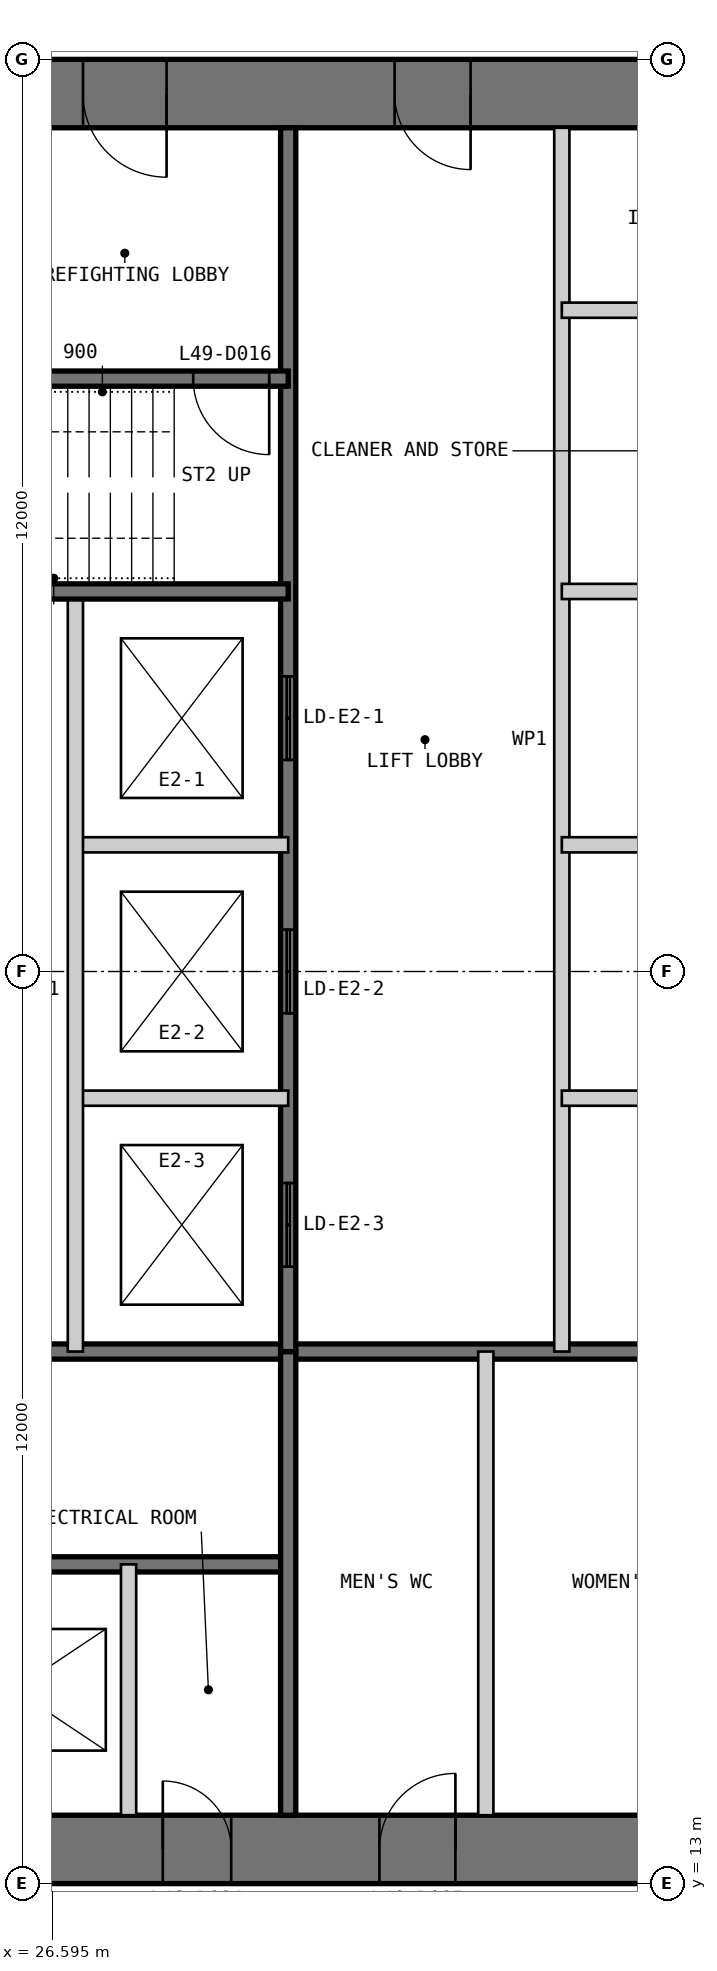
"""IFC4 building model, lengths in metres.
Left out: names, types, materials, properties, quantities, classifications, styles, units other than length and angle.
Written with IfcOpenShell. Run it as: python <this file> out.ifc"""

import sys

from ifc_helpers import new_model, si_unit, direction, frame, frame_2d, origin, place, context, subcontext, project, spatial, polyline, rectangle, outline, extrude, element, fill, save


model = new_model("IFC4")
c1 = context("Model", 3, precision=1e-05, world=origin(), true_north=direction((0.0, 1.0)))
c2 = subcontext(c1, "Body", "Model", "MODEL_VIEW")
j1 = project(units=[si_unit("LENGTHUNIT", "METRE"), si_unit("PLANEANGLEUNIT", "RADIAN")], contexts=[c1])
p1 = place(None, origin())
s1 = spatial("IfcSite", under=j1, at=p1, CompositionType="ELEMENT")
p2 = place(p1, origin())
s2 = spatial("IfcBuilding", under=s1, at=p2, CompositionType="ELEMENT")
p3 = place(p2, frame((0.0, 0.0, 209.8)))
s3 = spatial("IfcBuildingStorey", under=s2, at=p3, CompositionType="ELEMENT", Elevation=209.8)
p4 = place(p3, frame((13.0, 13.45, 0.0), z_axis=(0.0, 0.0, 1.0), x_axis=(1.0, 0.0, 0.0)))
e1 = element("IfcWall", 1, at=p4, inside=s3, PredefinedType="SHEAR", context=c2, shape_type="SweptSolid", body=[
    extrude(outline(polyline([(0.0, -0.45), (24.0, -0.45), (23.1, 0.45), (0.9, 0.45), (0.0, -0.45)])), origin(), (0.0, 0.0, 1.0), 4.0),
])
p5 = place(p4, frame((4.9, 0.0, 0.0)))
e2 = element("IfcOpeningElement", 2, at=p5, cuts=e1, PredefinedType="OPENING", context=c2, shape_type="SweptSolid", body=[
    extrude(rectangle(XDim=1.0, YDim=2.2, at=frame_2d((0.5, 1.1))), frame((0.0, 0.46, 0.0), z_axis=(0.0, -1.0, 0.0), x_axis=(1.0, 0.0, 0.0)), (0.0, 0.0, 1.0), 0.92),
])
p6 = place(p4, frame((8.9, 0.0, 0.0)))
e3 = element("IfcOpeningElement", 3, at=p6, cuts=e1, PredefinedType="OPENING", context=c2, shape_type="SweptSolid", body=[
    extrude(rectangle(XDim=1.1, YDim=2.2, at=frame_2d((0.55, 1.1))), frame((0.0, 0.46, 0.0), z_axis=(0.0, -1.0, 0.0), x_axis=(1.0, 0.0, 0.0)), (0.0, 0.0, 1.0), 0.92),
])
p7 = place(p4, frame((15.05, 0.0, 0.0)))
e4 = element("IfcOpeningElement", 4, at=p7, cuts=e1, PredefinedType="OPENING", context=c2, shape_type="SweptSolid", body=[
    extrude(rectangle(XDim=0.9, YDim=2.2, at=frame_2d((0.45, 1.1))), frame((0.0, 0.46, 0.0), z_axis=(0.0, -1.0, 0.0), x_axis=(1.0, 0.0, 0.0)), (0.0, 0.0, 1.0), 0.92),
])
p8 = place(p4, frame((17.9, 0.0, 0.0)))
e5 = element("IfcOpeningElement", 5, at=p8, cuts=e1, PredefinedType="OPENING", context=c2, shape_type="SweptSolid", body=[
    extrude(rectangle(XDim=1.0, YDim=2.2, at=frame_2d((0.5, 1.1))), frame((0.0, 0.46, 0.0), z_axis=(0.0, -1.0, 0.0), x_axis=(1.0, 0.0, 0.0)), (0.0, 0.0, 1.0), 0.92),
])
p9 = place(p4, frame((21.4, 0.0, 0.0)))
e6 = element("IfcOpeningElement", 6, at=p9, cuts=e1, PredefinedType="OPENING", context=c2, shape_type="SweptSolid", body=[
    extrude(rectangle(XDim=1.0, YDim=2.2, at=frame_2d((0.5, 1.1))), frame((0.0, 0.46, 0.0), z_axis=(0.0, -1.0, 0.0), x_axis=(1.0, 0.0, 0.0)), (0.0, 0.0, 1.0), 0.92),
])
p10 = place(p3, frame((37.0, 36.55, 0.0), z_axis=(0.0, 0.0, 1.0), x_axis=(-1.0, 0.0, 0.0)))
e7 = element("IfcWall", 7, at=p10, inside=s3, PredefinedType="SHEAR", context=c2, shape_type="SweptSolid", body=[
    extrude(outline(polyline([(0.0, -0.45), (24.0, -0.45), (23.1, 0.45), (0.9, 0.45), (0.0, -0.45)])), origin(), (0.0, 0.0, 1.0), 4.0),
])
p11 = place(p10, frame((4.9, 0.0, 0.0)))
e8 = element("IfcOpeningElement", 8, at=p11, cuts=e7, PredefinedType="OPENING", context=c2, shape_type="SweptSolid", body=[
    extrude(rectangle(XDim=1.0, YDim=2.2, at=frame_2d((0.5, 1.1))), frame((0.0, 0.46, 0.0), z_axis=(0.0, -1.0, 0.0), x_axis=(1.0, 0.0, 0.0)), (0.0, 0.0, 1.0), 0.92),
])
p12 = place(p10, frame((8.9, 0.0, 0.0)))
e9 = element("IfcOpeningElement", 9, at=p12, cuts=e7, PredefinedType="OPENING", context=c2, shape_type="SweptSolid", body=[
    extrude(rectangle(XDim=1.1, YDim=2.2, at=frame_2d((0.55, 1.1))), frame((0.0, 0.46, 0.0), z_axis=(0.0, -1.0, 0.0), x_axis=(1.0, 0.0, 0.0)), (0.0, 0.0, 1.0), 0.92),
])
p13 = place(p10, frame((15.05, 0.0, 0.0)))
e10 = element("IfcOpeningElement", 10, at=p13, cuts=e7, PredefinedType="OPENING", context=c2, shape_type="SweptSolid", body=[
    extrude(rectangle(XDim=0.9, YDim=2.2, at=frame_2d((0.45, 1.1))), frame((0.0, 0.46, 0.0), z_axis=(0.0, -1.0, 0.0), x_axis=(1.0, 0.0, 0.0)), (0.0, 0.0, 1.0), 0.92),
])
p14 = place(p10, frame((17.9, 0.0, 0.0)))
e11 = element("IfcOpeningElement", 11, at=p14, cuts=e7, PredefinedType="OPENING", context=c2, shape_type="SweptSolid", body=[
    extrude(rectangle(XDim=1.0, YDim=2.2, at=frame_2d((0.5, 1.1))), frame((0.0, 0.46, 0.0), z_axis=(0.0, -1.0, 0.0), x_axis=(1.0, 0.0, 0.0)), (0.0, 0.0, 1.0), 0.92),
])
p15 = place(p10, frame((21.4, 0.0, 0.0)))
e12 = element("IfcOpeningElement", 12, at=p15, cuts=e7, PredefinedType="OPENING", context=c2, shape_type="SweptSolid", body=[
    extrude(rectangle(XDim=1.0, YDim=2.2, at=frame_2d((0.5, 1.1))), frame((0.0, 0.46, 0.0), z_axis=(0.0, -1.0, 0.0), x_axis=(1.0, 0.0, 0.0)), (0.0, 0.0, 1.0), 0.92),
])
p16 = place(p3, frame((20.3, 17.2, 0.0), z_axis=(0.0, 0.0, 1.0), x_axis=(1.0, 0.0, 0.0)))
e13 = element("IfcWall", 13, at=p16, inside=s3, PredefinedType="SOLIDWALL", context=c2, shape_type="SweptSolid", body=[
    extrude(rectangle(XDim=9.4, YDim=0.2, at=frame_2d((4.7, 0.0))), origin(), (0.0, 0.0, 1.0), 3.8),
])
p17 = place(p16, frame((0.25, 0.0, 0.0)))
e14 = element("IfcOpeningElement", 14, at=p17, cuts=e13, PredefinedType="OPENING", context=c2, shape_type="SweptSolid", body=[
    extrude(rectangle(XDim=1.0, YDim=2.2, at=frame_2d((0.5, 1.1))), frame((0.0, 0.11, 0.0), z_axis=(0.0, -1.0, 0.0), x_axis=(1.0, 0.0, 0.0)), (0.0, 0.0, 1.0), 0.22),
])
p18 = place(p3, frame((20.3, 20.0, 0.0), z_axis=(0.0, 0.0, 1.0), x_axis=(1.0, 0.0, 0.0)))
e15 = element("IfcWall", 15, at=p18, inside=s3, PredefinedType="SOLIDWALL", context=c2, shape_type="SweptSolid", body=[
    extrude(rectangle(XDim=15.8, YDim=0.2, at=frame_2d((7.9, 0.0))), origin(), (0.0, 0.0, 1.0), 3.8),
])
p19 = place(p3, frame((27.6, 13.9, 0.0), z_axis=(0.0, 0.0, 1.0), x_axis=(0.0, 1.0, 0.0)))
e16 = element("IfcWall", 16, at=p19, inside=s3, PredefinedType="PARTITIONING", context=c2, shape_type="SweptSolid", body=[
    extrude(rectangle(XDim=3.3, YDim=0.2, at=frame_2d((1.65, 0.0))), origin(), (0.0, 0.0, 1.0), 3.8),
])
p20 = place(p3, frame((29.7, 13.9, 0.0), z_axis=(0.0, 0.0, 1.0), x_axis=(0.0, 1.0, 0.0)))
e17 = element("IfcWall", 17, at=p20, inside=s3, PredefinedType="SOLIDWALL", context=c2, shape_type="SweptSolid", body=[
    extrude(rectangle(XDim=6.1, YDim=0.2, at=frame_2d((3.05, 0.0))), origin(), (0.0, 0.0, 1.0), 3.8),
])
p21 = place(p3, frame((32.3, 13.9, 0.0), z_axis=(0.0, 0.0, 1.0), x_axis=(0.0, 1.0, 0.0)))
e18 = element("IfcWall", 18, at=p21, inside=s3, PredefinedType="PARTITIONING", context=c2, shape_type="SweptSolid", body=[
    extrude(rectangle(XDim=6.1, YDim=0.2, at=frame_2d((3.05, 0.0))), origin(), (0.0, 0.0, 1.0), 3.8),
])
p22 = place(p3, frame((33.3, 36.1, 0.0), z_axis=(0.0, 0.0, 1.0), x_axis=(0.0, -1.0, 0.0)))
e19 = element("IfcWall", 19, at=p22, inside=s3, PredefinedType="PARTITIONING", context=c2, shape_type="SweptSolid", body=[
    extrude(rectangle(XDim=16.1, YDim=0.2, at=frame_2d((8.05, 0.0))), origin(), (0.0, 0.0, 1.0), 3.8),
])
p23 = place(p3, frame((29.7, 36.1, 0.0), z_axis=(0.0, 0.0, 1.0), x_axis=(0.0, -1.0, 0.0)))
e20 = element("IfcWall", 20, at=p23, inside=s3, PredefinedType="SOLIDWALL", context=c2, shape_type="SweptSolid", body=[
    extrude(rectangle(XDim=16.1, YDim=0.2, at=frame_2d((8.05, 0.0))), origin(), (0.0, 0.0, 1.0), 3.8),
])
p24 = place(p23, frame((7.217, 0.0, 0.0)))
e21 = element("IfcOpeningElement", 21, at=p24, cuts=e20, PredefinedType="OPENING", context=c2, shape_type="SweptSolid", body=[
    extrude(rectangle(XDim=1.1, YDim=2.2, at=frame_2d((0.55, 1.1))), frame((0.0, 0.11, 0.0), z_axis=(0.0, -1.0, 0.0), x_axis=(1.0, 0.0, 0.0)), (0.0, 0.0, 1.0), 0.22),
])
p25 = place(p23, frame((10.55, 0.0, 0.0)))
e22 = element("IfcOpeningElement", 22, at=p25, cuts=e20, PredefinedType="OPENING", context=c2, shape_type="SweptSolid", body=[
    extrude(rectangle(XDim=1.1, YDim=2.2, at=frame_2d((0.55, 1.1))), frame((0.0, 0.11, 0.0), z_axis=(0.0, -1.0, 0.0), x_axis=(1.0, 0.0, 0.0)), (0.0, 0.0, 1.0), 0.22),
])
p26 = place(p23, frame((13.883, 0.0, 0.0)))
e23 = element("IfcOpeningElement", 23, at=p26, cuts=e20, PredefinedType="OPENING", context=c2, shape_type="SweptSolid", body=[
    extrude(rectangle(XDim=1.1, YDim=2.2, at=frame_2d((0.55, 1.1))), frame((0.0, 0.11, 0.0), z_axis=(0.0, -1.0, 0.0), x_axis=(1.0, 0.0, 0.0)), (0.0, 0.0, 1.0), 0.22),
])
for number, where, z_axis, x_axis in (
    (24, (36.1, 30.0, 0.0), (0.0, 0.0, 1.0), (-1.0, 0.0, 0.0)),
    (25, (36.1, 26.667, 0.0), (0.0, 0.0, 1.0), (-1.0, 0.0, 0.0)),
    (26, (36.1, 23.333, 0.0), (0.0, 0.0, 1.0), (-1.0, 0.0, 0.0)),
    (27, (29.7, 26.667, 0.0), (0.0, 0.0, 1.0), (-1.0, 0.0, 0.0)),
    (28, (29.7, 23.333, 0.0), (0.0, 0.0, 1.0), (-1.0, 0.0, 0.0)),
):
    element("IfcWall", number, at=place(p3, frame(where, z_axis=z_axis, x_axis=x_axis)), inside=s3, PredefinedType="PARTITIONING", context=c2, shape_type="SweptSolid", body=[
        extrude(rectangle(XDim=2.8, YDim=0.2, at=frame_2d((1.4, 0.0))), origin(), (0.0, 0.0, 1.0), 3.8),
    ])
p27 = place(p3, frame((26.9, 30.0, 0.0), z_axis=(0.0, 0.0, 1.0), x_axis=(0.0, -1.0, 0.0)))
e29 = element("IfcWall", 29, at=p27, inside=s3, PredefinedType="PARTITIONING", context=c2, shape_type="SweptSolid", body=[
    extrude(rectangle(XDim=10.0, YDim=0.2, at=frame_2d((5.0, 0.0))), origin(), (0.0, 0.0, 1.0), 3.8),
])
p28 = place(p3, frame((29.7, 32.8, 0.0), z_axis=(0.0, 0.0, 1.0), x_axis=(-1.0, 0.0, 0.0)))
e30 = element("IfcWall", 30, at=p28, inside=s3, PredefinedType="SOLIDWALL", context=c2, shape_type="SweptSolid", body=[
    extrude(rectangle(XDim=9.4, YDim=0.2, at=frame_2d((4.7, 0.0))), origin(), (0.0, 0.0, 1.0), 3.8),
])
p29 = place(p28, frame((0.25, 0.0, 0.0)))
e31 = element("IfcOpeningElement", 31, at=p29, cuts=e30, PredefinedType="OPENING", context=c2, shape_type="SweptSolid", body=[
    extrude(rectangle(XDim=1.0, YDim=2.2, at=frame_2d((0.5, 1.1))), frame((0.0, 0.11, 0.0), z_axis=(0.0, -1.0, 0.0), x_axis=(1.0, 0.0, 0.0)), (0.0, 0.0, 1.0), 0.22),
])
p30 = place(p3, frame((29.7, 30.0, 0.0), z_axis=(0.0, 0.0, 1.0), x_axis=(-1.0, 0.0, 0.0)))
e32 = element("IfcWall", 32, at=p30, inside=s3, PredefinedType="SOLIDWALL", context=c2, shape_type="SweptSolid", body=[
    extrude(rectangle(XDim=15.8, YDim=0.2, at=frame_2d((7.9, 0.0))), origin(), (0.0, 0.0, 1.0), 3.8),
])
p31 = place(p3, frame((36.1, 33.7, 0.0), z_axis=(0.0, 0.0, 1.0), x_axis=(-1.0, 0.0, 0.0)))
e33 = element("IfcWall", 33, at=p31, inside=s3, PredefinedType="PARTITIONING", context=c2, shape_type="SweptSolid", body=[
    extrude(rectangle(XDim=2.8, YDim=0.2, at=frame_2d((1.4, 0.0))), origin(), (0.0, 0.0, 1.0), 3.8),
])
p32 = place(p7, origin())
e34 = element("IfcDoor", 34, at=p32, inside=s3, OperationType="SINGLE_SWING_LEFT", PredefinedType="DOOR", context=c2, shape_type="SweptSolid", body=[
    extrude(rectangle(XDim=0.9, YDim=2.2, at=frame_2d((0.45, 1.1))), frame((0.0, 0.025, 0.0), z_axis=(0.0, -1.0, 0.0), x_axis=(1.0, 0.0, 0.0)), (0.0, 0.0, 1.0), 0.05),
    extrude(outline(polyline([(0.0, 0.0), (0.04, 0.0), (0.04, 2.16), (0.86, 2.16), (0.86, 0.0), (0.9, 0.0), (0.9, 2.2), (0.0, 2.2), (0.0, 0.0)])), frame((0.0, 0.3, 0.0), z_axis=(0.0, -1.0, 0.0), x_axis=(1.0, 0.0, 0.0)), (0.0, 0.0, 1.0), 0.6),
])
fill(e4, e34)
p33 = place(p8, origin())
e35 = element("IfcDoor", 35, at=p33, inside=s3, OperationType="SINGLE_SWING_RIGHT", PredefinedType="DOOR", context=c2, shape_type="SweptSolid", body=[
    extrude(rectangle(XDim=1.0, YDim=2.2, at=frame_2d((0.5, 1.1))), frame((0.0, 0.025, 0.0), z_axis=(0.0, -1.0, 0.0), x_axis=(1.0, 0.0, 0.0)), (0.0, 0.0, 1.0), 0.05),
    extrude(outline(polyline([(0.0, 0.0), (0.04, 0.0), (0.04, 2.16), (0.96, 2.16), (0.96, 0.0), (1.0, 0.0), (1.0, 2.2), (0.0, 2.2), (0.0, 0.0)])), frame((0.0, 0.3, 0.0), z_axis=(0.0, -1.0, 0.0), x_axis=(1.0, 0.0, 0.0)), (0.0, 0.0, 1.0), 0.6),
])
fill(e5, e35)
p34 = place(p11, origin())
e36 = element("IfcDoor", 36, at=p34, inside=s3, OperationType="SINGLE_SWING_LEFT", PredefinedType="DOOR", context=c2, shape_type="SweptSolid", body=[
    extrude(rectangle(XDim=1.0, YDim=2.2, at=frame_2d((0.5, 1.1))), frame((0.0, 0.025, 0.0), z_axis=(0.0, -1.0, 0.0), x_axis=(1.0, 0.0, 0.0)), (0.0, 0.0, 1.0), 0.05),
    extrude(outline(polyline([(0.0, 0.0), (0.04, 0.0), (0.04, 2.16), (0.96, 2.16), (0.96, 0.0), (1.0, 0.0), (1.0, 2.2), (0.0, 2.2), (0.0, 0.0)])), frame((0.0, 0.3, 0.0), z_axis=(0.0, -1.0, 0.0), x_axis=(1.0, 0.0, 0.0)), (0.0, 0.0, 1.0), 0.6),
])
fill(e8, e36)
p35 = place(p12, origin())
e37 = element("IfcDoor", 37, at=p35, inside=s3, OperationType="SINGLE_SWING_LEFT", PredefinedType="DOOR", context=c2, shape_type="SweptSolid", body=[
    extrude(rectangle(XDim=1.1, YDim=2.2, at=frame_2d((0.55, 1.1))), frame((0.0, 0.025, 0.0), z_axis=(0.0, -1.0, 0.0), x_axis=(1.0, 0.0, 0.0)), (0.0, 0.0, 1.0), 0.05),
    extrude(outline(polyline([(0.0, 0.0), (0.04, 0.0), (0.04, 2.16), (1.06, 2.16), (1.06, 0.0), (1.1, 0.0), (1.1, 2.2), (0.0, 2.2), (0.0, 0.0)])), frame((0.0, 0.3, 0.0), z_axis=(0.0, -1.0, 0.0), x_axis=(1.0, 0.0, 0.0)), (0.0, 0.0, 1.0), 0.6),
])
fill(e9, e37)
p36 = place(p29, origin())
e38 = element("IfcDoor", 38, at=p36, inside=s3, OperationType="SINGLE_SWING_LEFT", PredefinedType="DOOR", context=c2, shape_type="SweptSolid", body=[
    extrude(rectangle(XDim=1.0, YDim=2.2, at=frame_2d((0.5, 1.1))), frame((0.0, 0.025, 0.0), z_axis=(0.0, -1.0, 0.0), x_axis=(1.0, 0.0, 0.0)), (0.0, 0.0, 1.0), 0.05),
])
fill(e31, e38)
p37 = place(p24, origin())
e39 = element("IfcDoor", 39, at=p37, inside=s3, OperationType="DOUBLE_DOOR_SLIDING", PredefinedType="DOOR", context=c2, shape_type="SweptSolid", body=[
    extrude(rectangle(XDim=1.1, YDim=2.2, at=frame_2d((0.55, 1.1))), frame((0.0, 0.025, 0.0), z_axis=(0.0, -1.0, 0.0), x_axis=(1.0, 0.0, 0.0)), (0.0, 0.0, 1.0), 0.05),
])
fill(e21, e39)
p38 = place(p25, origin())
e40 = element("IfcDoor", 40, at=p38, inside=s3, OperationType="DOUBLE_DOOR_SLIDING", PredefinedType="DOOR", context=c2, shape_type="SweptSolid", body=[
    extrude(rectangle(XDim=1.1, YDim=2.2, at=frame_2d((0.55, 1.1))), frame((0.0, 0.025, 0.0), z_axis=(0.0, -1.0, 0.0), x_axis=(1.0, 0.0, 0.0)), (0.0, 0.0, 1.0), 0.05),
])
fill(e22, e40)
p39 = place(p26, origin())
e41 = element("IfcDoor", 41, at=p39, inside=s3, OperationType="DOUBLE_DOOR_SLIDING", PredefinedType="DOOR", context=c2, shape_type="SweptSolid", body=[
    extrude(rectangle(XDim=1.1, YDim=2.2, at=frame_2d((0.55, 1.1))), frame((0.0, 0.025, 0.0), z_axis=(0.0, -1.0, 0.0), x_axis=(1.0, 0.0, 0.0)), (0.0, 0.0, 1.0), 0.05),
])
fill(e23, e41)
save(model, sys.argv[1])
